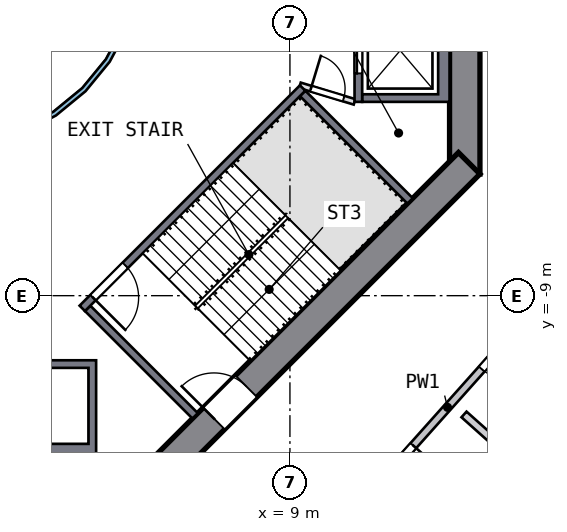
"""IFC4 building model, lengths in metres.
Left out: names, types, materials, properties, quantities, classifications, styles, units other than length and angle.
Written with IfcOpenShell. Run it as: python <this file> out.ifc"""

import sys

from ifc_helpers import new_model, si_unit, direction, frame, frame_2d, origin, place, context, subcontext, project, spatial, polyline, rectangle, outline, extrude, element, fill, save


model = new_model("IFC4")
c1 = context("Model", 3, precision=1e-05, world=origin(), true_north=direction((0.0, 1.0)))
c2 = subcontext(c1, "Body", "Model", "MODEL_VIEW")
j1 = project(units=[si_unit("LENGTHUNIT", "METRE"), si_unit("PLANEANGLEUNIT", "RADIAN")], contexts=[c1])
p1 = place(None, origin())
s1 = spatial("IfcSite", under=j1, at=p1, CompositionType="ELEMENT")
p2 = place(p1, origin())
s2 = spatial("IfcBuilding", under=s1, at=p2, CompositionType="ELEMENT")
p3 = place(p2, frame((0.0, 0.0, 107.0)))
s3 = spatial("IfcBuildingStorey", under=s2, at=p3, CompositionType="ELEMENT", Elevation=107.0)
p4 = place(p3, frame((13.6, -5.799, 0.0), z_axis=(0.0, 0.0, 1.0), x_axis=(0.0, 1.0, 0.0)))
e1 = element("IfcWall", 1, at=p4, inside=s3, PredefinedType="SHEAR", context=c2, shape_type="SweptSolid", body=[
    extrude(rectangle(XDim=11.598, YDim=0.8, at=frame_2d((5.799, 0.0))), origin(), (0.0, 0.0, 1.0), 4.5),
])
p5 = place(p4, frame((4.899, 0.0, 0.0)))
e2 = element("IfcOpeningElement", 2, at=p5, cuts=e1, PredefinedType="OPENING", context=c2, shape_type="SweptSolid", body=[
    extrude(rectangle(XDim=1.8, YDim=2.1, at=frame_2d((0.9, 1.05))), frame((0.0, 0.41, 0.0), z_axis=(0.0, -1.0, 0.0), x_axis=(1.0, 0.0, 0.0)), (0.0, 0.0, 1.0), 0.82),
])
p6 = place(p3, frame((5.516, -13.717, 0.0), z_axis=(0.0, 0.0, 1.0), x_axis=(0.707106781, 0.707106781, 0.0)))
e3 = element("IfcWall", 3, at=p6, inside=s3, PredefinedType="SHEAR", context=c2, shape_type="SweptSolid", body=[
    extrude(rectangle(XDim=11.598, YDim=0.8, at=frame_2d((5.799, 0.0))), origin(), (0.0, 0.0, 1.0), 4.5),
])
p7 = place(p6, frame((2.099, 0.0, 0.0)))
e4 = element("IfcOpeningElement", 4, at=p7, cuts=e3, PredefinedType="OPENING", context=c2, shape_type="SweptSolid", body=[
    extrude(rectangle(XDim=1.2, YDim=2.1, at=frame_2d((0.6, 1.05))), frame((0.0, 0.41, 0.0), z_axis=(0.0, -1.0, 0.0), x_axis=(1.0, 0.0, 0.0)), (0.0, 0.0, 1.0), 0.82),
])
p8 = place(p3, origin())
e5 = element("IfcWall", 5, at=p8, inside=s3, PredefinedType="SOLIDWALL", context=c2, shape_type="SweptSolid", body=[
    extrude(outline(polyline([(13.2, -3.9), (10.9, -3.9), (10.9, -3.7), (12.9, -3.7), (12.9, -1.4), (10.9, -1.4), (10.9, -1.2), (13.2, -1.2), (13.2, -3.9)])), origin(), (0.0, 0.0, 1.0), 4.19),
])
p9 = place(p3, frame((10.8, -1.2, 0.0), z_axis=(0.0, 0.0, 1.0), x_axis=(0.0, -1.0, 0.0)))
e6 = element("IfcWall", 6, at=p9, inside=s3, PredefinedType="SOLIDWALL", context=c2, shape_type="SweptSolid", body=[
    extrude(rectangle(XDim=2.7, YDim=0.2, at=frame_2d((1.35, 0.0))), origin(), (0.0, 0.0, 1.0), 4.19),
])
p10 = place(p9, frame((0.75, 0.0, 0.0)))
e7 = element("IfcOpeningElement", 7, at=p10, cuts=e6, PredefinedType="OPENING", context=c2, shape_type="SweptSolid", body=[
    extrude(rectangle(XDim=1.2, YDim=2.1, at=frame_2d((0.6, 1.05))), frame((0.0, 0.11, 0.0), z_axis=(0.0, -1.0, 0.0), x_axis=(1.0, 0.0, 0.0)), (0.0, 0.0, 1.0), 0.22),
])
p11 = place(p3, origin())
e8 = element("IfcWall", 8, at=p11, inside=s3, PredefinedType="SOLIDWALL", context=c2, shape_type="SweptSolid", body=[
    extrude(outline(polyline([(3.9, -10.7), (3.9, -13.2), (1.2, -13.2), (1.2, -10.7), (3.9, -10.7)]), holes=[polyline([(1.4, -12.9), (3.7, -12.9), (3.7, -10.9), (1.4, -10.9), (1.4, -12.9)])]), origin(), (0.0, 0.0, 1.0), 4.19),
])
p12 = place(p3, frame((9.334, -3.535, 0.0), z_axis=(0.0, 0.0, 1.0), x_axis=(-0.707106781, -0.707106781, 0.0)))
e9 = element("IfcWall", 9, at=p12, inside=s3, PredefinedType="SOLIDWALL", context=c2, shape_type="SweptSolid", body=[
    extrude(rectangle(XDim=8.2, YDim=0.2, at=frame_2d((4.1, 0.0))), origin(), (0.0, 0.0, 1.0), 4.19),
])
p13 = place(p12, frame((6.6, 0.0, 0.0)))
e10 = element("IfcOpeningElement", 10, at=p13, cuts=e9, PredefinedType="OPENING", context=c2, shape_type="SweptSolid", body=[
    extrude(rectangle(XDim=1.2, YDim=2.1, at=frame_2d((0.6, 1.05))), frame((0.0, 0.11, 0.0), z_axis=(0.0, -1.0, 0.0), x_axis=(1.0, 0.0, 0.0)), (0.0, 0.0, 1.0), 0.22),
])
for number, where, z_axis, x_axis in (
    (11, (3.677, -9.334, 0.0), (0.0, 0.0, 1.0), (0.707, -0.707, 0.0)),
    (12, (9.334, -3.677, 0.0), (0.0, 0.0, 1.0), (0.707, -0.707, 0.0)),
):
    element("IfcWall", number, at=place(p3, frame(where, z_axis=z_axis, x_axis=x_axis)), inside=s3, PredefinedType="SOLIDWALL", context=c2, shape_type="SweptSolid", body=[
        extrude(rectangle(XDim=4.0, YDim=0.2, at=frame_2d((2.0, 0.0))), origin(), (0.0, 0.0, 1.0), 4.19),
    ])
p14 = place(p3, frame((9.263, -3.465, 0.0), z_axis=(0.0, 0.0, 1.0), x_axis=(0.957084567, -0.289808785, 0.0)))
e13 = element("IfcWall", 13, at=p14, inside=s3, PredefinedType="PARTITIONING", context=c2, shape_type="SweptSolid", body=[
    extrude(rectangle(XDim=1.501, YDim=0.15, at=frame_2d((0.75, 0.0))), origin(), (0.0, 0.0, 1.0), 4.19),
])
p15 = place(p14, frame((0.301, 0.0, 0.0)))
e14 = element("IfcOpeningElement", 14, at=p15, cuts=e13, PredefinedType="OPENING", context=c2, shape_type="SweptSolid", body=[
    extrude(rectangle(XDim=0.9, YDim=2.1, at=frame_2d((0.45, 1.05))), frame((0.0, 0.085, 0.0), z_axis=(0.0, -1.0, 0.0), x_axis=(1.0, 0.0, 0.0)), (0.0, 0.0, 1.0), 0.17),
])
p16 = place(p3, origin())
e15 = element("IfcWall", 15, at=p16, inside=s3, PredefinedType="SOLIDWALL", context=c2, shape_type="SweptSolid", body=[
    extrude(outline(polyline([(5.021, -0.999), (4.73, -1.959), (4.257, -2.844), (3.62, -3.62), (2.844, -4.257), (1.959, -4.73), (0.999, -5.021), (0.0, -5.12), (-0.999, -5.021), (-1.959, -4.73), (-2.844, -4.257), (-3.62, -3.62), (-4.257, -2.844), (-4.73, -1.959), (-5.021, -0.999), (-5.12, 0.0), (-5.021, 0.999), (-4.73, 1.959), (-4.257, 2.844), (-3.62, 3.62), (-2.844, 4.257), (-1.959, 4.73), (-0.999, 5.021), (0.0, 5.12), (0.999, 5.021), (1.959, 4.73), (2.844, 4.257), (3.62, 3.62), (4.257, 2.844), (4.73, 1.959), (5.021, 0.999), (5.12, 0.0), (5.021, -0.999)]), holes=[polyline([(4.904, 0.976), (4.619, 1.913), (4.157, 2.778), (3.535, 3.535), (2.778, 4.157), (1.913, 4.619), (0.976, 4.904), (0.0, 5.0), (-0.976, 4.904), (-1.913, 4.619), (-2.778, 4.157), (-3.535, 3.535), (-4.157, 2.778), (-4.619, 1.913), (-4.904, 0.976), (-5.0, 0.0), (-4.904, -0.976), (-4.619, -1.913), (-4.157, -2.778), (-3.535, -3.535), (-2.778, -4.157), (-1.913, -4.619), (-0.976, -4.904), (0.0, -5.0), (0.976, -4.904), (1.913, -4.619), (2.778, -4.157), (3.535, -3.535), (4.157, -2.778), (4.619, -1.913), (4.904, -0.976), (5.0, 0.0), (4.904, 0.976)])]), origin(), (0.0, 0.0, 1.0), 4.19),
])
p17 = place(p3, frame((16.416, -8.278, 0.0), z_axis=(0.0, 0.0, 1.0), x_axis=(-0.666014728, -0.745938592, 0.0)))
e16 = element("IfcWall", 16, at=p17, inside=s3, PredefinedType="SOLIDWALL", context=c2, shape_type="SweptSolid", body=[
    extrude(rectangle(XDim=9.317, YDim=0.2, at=frame_2d((4.658, 0.0))), origin(), (0.0, 0.0, 1.0), 4.19),
])
p18 = place(p17, frame((6.258, 0.0, 0.0)))
e17 = element("IfcOpeningElement", 17, at=p18, cuts=e16, PredefinedType="OPENING", context=c2, shape_type="SweptSolid", body=[
    extrude(rectangle(XDim=1.8, YDim=2.1, at=frame_2d((0.9, 1.05))), frame((0.0, 0.11, 0.0), z_axis=(0.0, -1.0, 0.0), x_axis=(1.0, 0.0, 0.0)), (0.0, 0.0, 1.0), 0.22),
])
p19 = place(p17, frame((2.658, 0.0, 0.0)))
e18 = element("IfcOpeningElement", 18, at=p19, cuts=e16, PredefinedType="OPENING", context=c2, shape_type="SweptSolid", body=[
    extrude(rectangle(XDim=0.9, YDim=2.1, at=frame_2d((0.45, 1.05))), frame((0.0, 0.11, 0.0), z_axis=(0.0, -1.0, 0.0), x_axis=(1.0, 0.0, 0.0)), (0.0, 0.0, 1.0), 0.22),
])
p20 = place(p17, frame((0.3, 0.0, 0.0)))
e19 = element("IfcOpeningElement", 19, at=p20, cuts=e16, PredefinedType="OPENING", context=c2, shape_type="SweptSolid", body=[
    extrude(rectangle(XDim=0.9, YDim=2.1, at=frame_2d((0.45, 1.05))), frame((0.0, 0.11, 0.0), z_axis=(0.0, -1.0, 0.0), x_axis=(1.0, 0.0, 0.0)), (0.0, 0.0, 1.0), 0.22),
])
p21 = place(p3, frame((13.58, -12.125, 0.0), z_axis=(0.0, 0.0, 1.0), x_axis=(0.745931057, -0.666023167, 0.0)))
e20 = element("IfcWall", 20, at=p21, inside=s3, PredefinedType="SOLIDWALL", context=c2, shape_type="SweptSolid", body=[
    extrude(rectangle(XDim=5.903, YDim=0.2, at=frame_2d((2.951, 0.0))), origin(), (0.0, 0.0, 1.0), 4.19),
])
p22 = place(p10, origin())
e21 = element("IfcDoor", 21, at=p22, inside=s3, OperationType="DOUBLE_DOOR_SLIDING", PredefinedType="DOOR", context=c2, shape_type="SweptSolid", body=[
    extrude(rectangle(XDim=1.2, YDim=2.1, at=frame_2d((0.6, 1.05))), frame((0.0, 0.025, 0.0), z_axis=(0.0, -1.0, 0.0), x_axis=(1.0, 0.0, 0.0)), (0.0, 0.0, 1.0), 0.05),
])
fill(e7, e21)
p23 = place(p13, origin())
e22 = element("IfcDoor", 22, at=p23, inside=s3, OperationType="SINGLE_SWING_RIGHT", PredefinedType="DOOR", context=c2, shape_type="SweptSolid", body=[
    extrude(rectangle(XDim=1.2, YDim=2.1, at=frame_2d((0.6, 1.05))), frame((0.0, 0.025, 0.0), z_axis=(0.0, -1.0, 0.0), x_axis=(1.0, 0.0, 0.0)), (0.0, 0.0, 1.0), 0.05),
])
fill(e10, e22)
p24 = place(p7, origin())
e23 = element("IfcDoor", 23, at=p24, inside=s3, OperationType="SINGLE_SWING_LEFT", PredefinedType="DOOR", context=c2, shape_type="SweptSolid", body=[
    extrude(rectangle(XDim=1.2, YDim=2.1, at=frame_2d((0.6, 1.05))), frame((0.0, 0.025, 0.0), z_axis=(0.0, -1.0, 0.0), x_axis=(1.0, 0.0, 0.0)), (0.0, 0.0, 1.0), 0.05),
])
fill(e4, e23)
p25 = place(p15, origin())
e24 = element("IfcDoor", 24, at=p25, inside=s3, OperationType="SINGLE_SWING_LEFT", PredefinedType="DOOR", context=c2, shape_type="SweptSolid", body=[
    extrude(rectangle(XDim=0.9, YDim=2.1, at=frame_2d((0.45, 1.05))), frame((0.0, 0.025, 0.0), z_axis=(0.0, -1.0, 0.0), x_axis=(1.0, 0.0, 0.0)), (0.0, 0.0, 1.0), 0.05),
])
fill(e14, e24)
p26 = place(p18, origin())
e25 = element("IfcDoor", 25, at=p26, inside=s3, OperationType="DOUBLE_DOOR_SINGLE_SWING", PredefinedType="DOOR", context=c2, shape_type="SweptSolid", body=[
    extrude(rectangle(XDim=1.8, YDim=2.1, at=frame_2d((0.9, 1.05))), frame((0.0, 0.025, 0.0), z_axis=(0.0, -1.0, 0.0), x_axis=(1.0, 0.0, 0.0)), (0.0, 0.0, 1.0), 0.05),
])
fill(e17, e25)
p27 = place(p19, origin())
e26 = element("IfcDoor", 26, at=p27, inside=s3, OperationType="SINGLE_SWING_LEFT", PredefinedType="DOOR", context=c2, shape_type="SweptSolid", body=[
    extrude(rectangle(XDim=0.9, YDim=2.1, at=frame_2d((0.45, 1.05))), frame((0.0, 0.025, 0.0), z_axis=(0.0, -1.0, 0.0), x_axis=(1.0, 0.0, 0.0)), (0.0, 0.0, 1.0), 0.05),
])
fill(e18, e26)
save(model, sys.argv[1])
